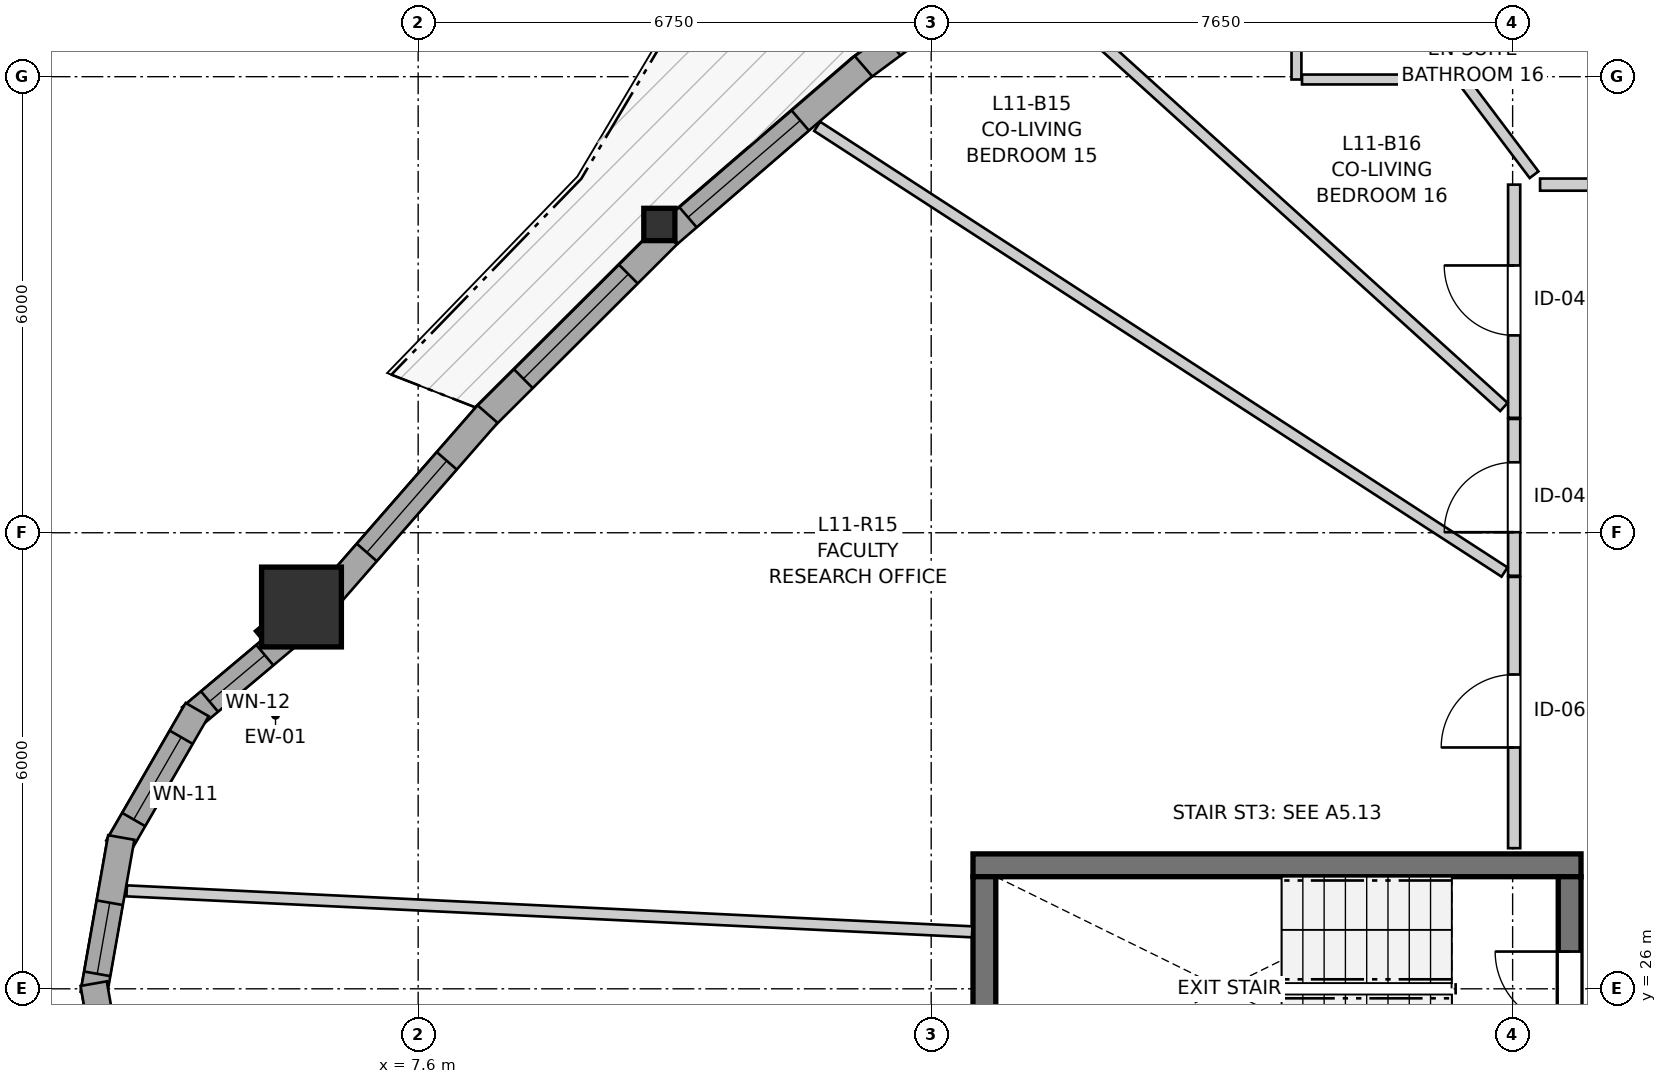
"""IFC4 building model, lengths in metres.
Left out: names, types, materials, properties, quantities, classifications, styles, units other than length and angle.
Written with IfcOpenShell. Run it as: python <this file> out.ifc"""

import sys

from ifc_helpers import new_model, si_unit, direction, frame, frame_2d, origin, origin_2d, place, context, subcontext, project, spatial, rectangle, i_section, extrude, source, transform, mapped, element, fill, save


model = new_model("IFC4")
c1 = context("Model", 3, precision=1e-05, world=origin(), true_north=direction((0.0, 1.0)))
c2 = subcontext(c1, "Body", "Model", "MODEL_VIEW")
j1 = project(units=[si_unit("LENGTHUNIT", "METRE"), si_unit("PLANEANGLEUNIT", "RADIAN")], contexts=[c1])
p1 = place(None, origin())
s1 = spatial("IfcSite", under=j1, at=p1, CompositionType="ELEMENT")
p2 = place(p1, origin())
s2 = spatial("IfcBuilding", under=s1, at=p2, CompositionType="ELEMENT")
p3 = place(p2, frame((0.0, 0.0, 39.8)))
s3 = spatial("IfcBuildingStorey", under=s2, at=p3, CompositionType="ELEMENT", Elevation=39.8)
p4 = place(p3, frame((22.9, 27.625, 0.0), z_axis=(0.0, 0.0, 1.0), x_axis=(-1.0, 0.0, 0.0)))
e1 = element("IfcWall", 1, at=p4, inside=s3, PredefinedType="SHEAR", context=c2, shape_type="SweptSolid", body=[
    extrude(rectangle(XDim=8.0, YDim=0.3, at=frame_2d((4.0, 0.0))), origin(), (0.0, 0.0, 1.0), 2.94),
])
p5 = place(p3, frame((15.05, 27.475, 0.0), z_axis=(0.0, 0.0, 1.0), x_axis=(0.0, -1.0, 0.0)))
e2 = element("IfcWall", 2, at=p5, inside=s3, PredefinedType="SHEAR", context=c2, shape_type="SweptSolid", body=[
    extrude(rectangle(XDim=2.95, YDim=0.3, at=frame_2d((1.475, 0.0))), origin(), (0.0, 0.0, 1.0), 2.94),
])
p6 = place(p3, frame((22.75, 24.525, 0.0), z_axis=(0.0, 0.0, 1.0), x_axis=(0.0, 1.0, 0.0)))
e3 = element("IfcWall", 3, at=p6, inside=s3, PredefinedType="SHEAR", context=c2, shape_type="SweptSolid", body=[
    extrude(rectangle(XDim=2.95, YDim=0.3, at=frame_2d((1.475, 0.0))), origin(), (0.0, 0.0, 1.0), 2.94),
])
p7 = place(p6, frame((0.985, 0.0, 0.0)))
e4 = element("IfcOpeningElement", 4, at=p7, cuts=e3, PredefinedType="OPENING", context=c2, shape_type="SweptSolid", body=[
    extrude(rectangle(XDim=0.98, YDim=2.15, at=frame_2d((0.49, 1.075))), frame((0.0, 0.16, 0.0), z_axis=(0.0, -1.0, 0.0), x_axis=(1.0, 0.0, 0.0)), (0.0, 0.0, 1.0), 0.32),
])
m1 = source(origin(), c2, "Body", "SweptSolid", [
    extrude(rectangle(XDim=1.05, YDim=1.05, at=origin_2d()), origin(), (0.0, 0.0, 1.0), 2.94),
])
p8 = place(p3, frame((6.065, 31.023, 0.0), z_axis=(0.0, 0.0, 1.0), x_axis=(1.0, 0.0, 0.0)))
e5 = element("IfcColumn", 5, at=p8, inside=s3, PredefinedType="COLUMN", context=c2, shape_type="MappedRepresentation", body=[
    mapped(m1, transform((0.0, 0.0, 0.0), x_axis=(1.0, 0.0, 0.0), y_axis=(0.0, 1.0, 0.0), z_axis=(0.0, 0.0, 1.0), scale=1.0)),
])
m2 = source(origin(), c2, "Body", "SweptSolid", [
    extrude(i_section(OverallWidth=0.409, OverallDepth=0.425, WebThickness=0.03, FlangeThickness=0.048, FilletRadius=0.015, at=origin_2d()), origin(), (0.0, 0.0, 1.0), 2.94),
])
p9 = place(p3, frame((10.773, 36.056, 0.0), z_axis=(0.0, 0.0, 1.0), x_axis=(1.0, 0.0, 0.0)))
e6 = element("IfcColumn", 6, at=p9, inside=s3, PredefinedType="PILASTER", context=c2, shape_type="MappedRepresentation", body=[
    mapped(m2, transform((0.0, 0.0, 0.0), x_axis=(1.0, 0.0, 0.0), y_axis=(0.0, 1.0, 0.0), z_axis=(0.0, 0.0, 1.0), scale=1.0)),
])
p10 = place(p3, frame((5.948, 30.696, 0.0), z_axis=(0.0, 0.0, 1.0), x_axis=(-0.766058770736, -0.642770534311, 0.0)))
e7 = element("IfcWall", 7, at=p10, inside=s3, PredefinedType="SOLIDWALL", context=c2, shape_type="SweptSolid", body=[
    extrude(rectangle(XDim=1.752, YDim=0.35, at=frame_2d((0.876, 0.0))), origin(), (0.0, 0.0, 1.0), 2.42),
])
p11 = place(p10, frame((0.476, 0.0, 0.82)))
e8 = element("IfcOpeningElement", 8, at=p11, cuts=e7, PredefinedType="OPENING", context=c2, shape_type="SweptSolid", body=[
    extrude(rectangle(XDim=0.95, YDim=1.35, at=frame_2d((0.475, 0.675))), frame((0.0, 0.185, 0.0), z_axis=(0.0, -1.0, 0.0), x_axis=(1.0, 0.0, 0.0)), (0.0, 0.0, 1.0), 0.37),
])
p12 = place(p3, frame((4.692, 29.674, 0.0), z_axis=(0.0, 0.0, 1.0), x_axis=(-0.49990781971, -0.866078617559, 0.0)))
e9 = element("IfcWall", 9, at=p12, inside=s3, PredefinedType="SOLIDWALL", context=c2, shape_type="SweptSolid", body=[
    extrude(rectangle(XDim=2.09, YDim=0.35, at=frame_2d((1.045, 0.0))), origin(), (0.0, 0.0, 1.0), 2.42),
])
p13 = place(p12, frame((0.42, 0.0, 0.82)))
e10 = element("IfcOpeningElement", 10, at=p13, cuts=e9, PredefinedType="OPENING", context=c2, shape_type="SweptSolid", body=[
    extrude(rectangle(XDim=1.25, YDim=1.35, at=frame_2d((0.625, 0.675))), frame((0.0, 0.185, 0.0), z_axis=(0.0, -1.0, 0.0), x_axis=(1.0, 0.0, 0.0)), (0.0, 0.0, 1.0), 0.37),
])
p14 = place(p3, frame((3.694, 27.991, 0.0), z_axis=(0.0, 0.0, 1.0), x_axis=(-0.173558792186, -0.984823509902, 0.0)))
e11 = element("IfcWall", 11, at=p14, inside=s3, PredefinedType="SOLIDWALL", context=c2, shape_type="SweptSolid", body=[
    extrude(rectangle(XDim=2.09, YDim=0.35, at=frame_2d((1.045, 0.0))), origin(), (0.0, 0.0, 1.0), 2.42),
])
p15 = place(p14, frame((0.871, 0.0, 0.82)))
e12 = element("IfcOpeningElement", 12, at=p15, cuts=e11, PredefinedType="OPENING", context=c2, shape_type="SweptSolid", body=[
    extrude(rectangle(XDim=0.95, YDim=1.35, at=frame_2d((0.475, 0.675))), frame((0.0, 0.185, 0.0), z_axis=(0.0, -1.0, 0.0), x_axis=(1.0, 0.0, 0.0)), (0.0, 0.0, 1.0), 0.37),
])
p16 = place(p3, frame((3.331, 26.068, 0.0), z_axis=(0.0, 0.0, 1.0), x_axis=(0.173558792186, -0.984823509902, 0.0)))
e13 = element("IfcWall", 13, at=p16, inside=s3, PredefinedType="SOLIDWALL", context=c2, shape_type="SweptSolid", body=[
    extrude(rectangle(XDim=2.09, YDim=0.35, at=frame_2d((1.045, 0.0))), origin(), (0.0, 0.0, 1.0), 2.42),
])
p17 = place(p16, frame((0.32, 0.0, 0.82)))
e14 = element("IfcOpeningElement", 14, at=p17, cuts=e13, PredefinedType="OPENING", context=c2, shape_type="SweptSolid", body=[
    extrude(rectangle(XDim=1.45, YDim=1.25, at=frame_2d((0.725, 0.625))), frame((0.0, 0.185, 0.0), z_axis=(0.0, -1.0, 0.0), x_axis=(1.0, 0.0, 0.0)), (0.0, 0.0, 1.0), 0.37),
])
p18 = place(p3, frame((15.846, 39.902, 0.0), z_axis=(0.0, 0.0, 1.0), x_axis=(-0.803789189233, -0.594914228501, 0.0)))
e15 = element("IfcWall", 15, at=p18, inside=s3, PredefinedType="SOLIDWALL", context=c2, shape_type="SweptSolid", body=[
    extrude(rectangle(XDim=3.056, YDim=0.35, at=frame_2d((1.528, 0.0))), origin(), (0.0, 0.0, 1.0), 2.42),
])
p19 = place(p18, frame((1.044, 0.0, 0.82)))
e16 = element("IfcOpeningElement", 16, at=p19, cuts=e15, PredefinedType="OPENING", context=c2, shape_type="SweptSolid", body=[
    extrude(rectangle(XDim=1.45, YDim=1.25, at=frame_2d((0.725, 0.625))), frame((0.0, 0.185, 0.0), z_axis=(0.0, -1.0, 0.0), x_axis=(1.0, 0.0, 0.0)), (0.0, 0.0, 1.0), 0.37),
])
p20 = place(p3, frame((13.458, 38.139, 0.0), z_axis=(0.0, 0.0, 1.0), x_axis=(-0.757450680395, -0.652892385289, 0.0)))
e17 = element("IfcWall", 17, at=p20, inside=s3, PredefinedType="SOLIDWALL", context=c2, shape_type="SweptSolid", body=[
    extrude(rectangle(XDim=3.374, YDim=0.35, at=frame_2d((1.687, 0.0))), origin(), (0.0, 0.0, 1.0), 2.42),
])
p21 = place(p20, frame((1.097, 0.0, 0.82)))
e18 = element("IfcOpeningElement", 18, at=p21, cuts=e17, PredefinedType="OPENING", context=c2, shape_type="SweptSolid", body=[
    extrude(rectangle(XDim=1.95, YDim=1.4, at=frame_2d((0.975, 0.7))), frame((0.0, 0.185, 0.0), z_axis=(0.0, -1.0, 0.0), x_axis=(1.0, 0.0, 0.0)), (0.0, 0.0, 1.0), 0.37),
])
p22 = place(p3, frame((10.883, 35.918, 0.0), z_axis=(0.0, 0.0, 1.0), x_axis=(-0.708386995502, -0.70582424484, 0.0)))
e19 = element("IfcWall", 19, at=p22, inside=s3, PredefinedType="SOLIDWALL", context=c2, shape_type="SweptSolid", body=[
    extrude(rectangle(XDim=3.429, YDim=0.35, at=frame_2d((1.715, 0.0))), origin(), (0.0, 0.0, 1.0), 2.42),
])
p23 = place(p22, frame((0.73, 0.0, 0.82)))
e20 = element("IfcOpeningElement", 20, at=p23, cuts=e19, PredefinedType="OPENING", context=c2, shape_type="SweptSolid", body=[
    extrude(rectangle(XDim=1.95, YDim=1.4, at=frame_2d((0.975, 0.7))), frame((0.0, 0.185, 0.0), z_axis=(0.0, -1.0, 0.0), x_axis=(1.0, 0.0, 0.0)), (0.0, 0.0, 1.0), 0.37),
])
p24 = place(p3, frame((8.513, 33.561, 0.0), z_axis=(0.0, 0.0, 1.0), x_axis=(-0.657640586907, -0.753331838205, 0.0)))
e21 = element("IfcWall", 21, at=p24, inside=s3, PredefinedType="SOLIDWALL", context=c2, shape_type="SweptSolid", body=[
    extrude(rectangle(XDim=3.222, YDim=0.35, at=frame_2d((1.611, 0.0))), origin(), (0.0, 0.0, 1.0), 2.42),
])
p25 = place(p24, frame((0.816, 0.0, 0.82)))
e22 = element("IfcOpeningElement", 22, at=p25, cuts=e21, PredefinedType="OPENING", context=c2, shape_type="SweptSolid", body=[
    extrude(rectangle(XDim=1.6, YDim=1.35, at=frame_2d((0.8, 0.675))), frame((0.0, 0.185, 0.0), z_axis=(0.0, -1.0, 0.0), x_axis=(1.0, 0.0, 0.0)), (0.0, 0.0, 1.0), 0.37),
])
p26 = place(p3, frame((22.02, 27.85, 0.0), z_axis=(0.0, 0.0, 1.0), x_axis=(0.0, 1.0, 0.0)))
e23 = element("IfcWall", 23, at=p26, inside=s3, PredefinedType="PARTITIONING", context=c2, shape_type="SweptSolid", body=[
    extrude(rectangle(XDim=3.569, YDim=0.16, at=frame_2d((1.784, 0.0))), origin(), (0.0, 0.0, 1.0), 2.94),
])
p27 = place(p26, frame((1.325, 0.0, 0.0)))
e24 = element("IfcOpeningElement", 24, at=p27, cuts=e23, PredefinedType="OPENING", context=c2, shape_type="SweptSolid", body=[
    extrude(rectangle(XDim=0.96, YDim=2.1, at=frame_2d((0.48, 1.05))), frame((0.0, 0.09, 0.0), z_axis=(0.0, -1.0, 0.0), x_axis=(1.0, 0.0, 0.0)), (0.0, 0.0, 1.0), 0.18),
])
p28 = place(p3, frame((22.361, 36.58, 0.0), z_axis=(0.0, 0.0, 1.0), x_axis=(1.0, 0.0, 0.0)))
e25 = element("IfcWall", 25, at=p28, inside=s3, PredefinedType="PARTITIONING", context=c2, shape_type="SweptSolid", body=[
    extrude(rectangle(XDim=3.498, YDim=0.16, at=frame_2d((1.749, 0.0))), origin(), (0.0, 0.0, 1.0), 2.548),
])
p29 = place(p28, frame((1.291, 0.0, 0.0)))
e26 = element("IfcOpeningElement", 26, at=p29, cuts=e25, PredefinedType="OPENING", context=c2, shape_type="SweptSolid", body=[
    extrude(rectangle(XDim=0.92, YDim=2.1, at=frame_2d((0.46, 1.05))), frame((0.0, 0.09, 0.0), z_axis=(0.0, -1.0, 0.0), x_axis=(1.0, 0.0, 0.0)), (0.0, 0.0, 1.0), 0.18),
])
p30 = place(p3, frame((22.02, 33.512, 0.0), z_axis=(0.0, 0.0, 1.0), x_axis=(0.0, 1.0, 0.0)))
e27 = element("IfcWall", 27, at=p30, inside=s3, PredefinedType="PARTITIONING", context=c2, shape_type="SweptSolid", body=[
    extrude(rectangle(XDim=3.068, YDim=0.16, at=frame_2d((1.534, 0.0))), origin(), (0.0, 0.0, 1.0), 2.94),
])
p31 = place(p30, frame((1.084, 0.0, 0.0)))
e28 = element("IfcOpeningElement", 28, at=p31, cuts=e27, PredefinedType="OPENING", context=c2, shape_type="SweptSolid", body=[
    extrude(rectangle(XDim=0.92, YDim=2.1, at=frame_2d((0.46, 1.05))), frame((0.0, 0.09, 0.0), z_axis=(0.0, -1.0, 0.0), x_axis=(1.0, 0.0, 0.0)), (0.0, 0.0, 1.0), 0.18),
])
p32 = place(p3, frame((22.02, 31.434, 0.0), z_axis=(0.0, 0.0, 1.0), x_axis=(0.0, 1.0, 0.0)))
e29 = element("IfcWall", 29, at=p32, inside=s3, PredefinedType="PARTITIONING", context=c2, shape_type="SweptSolid", body=[
    extrude(rectangle(XDim=2.063, YDim=0.16, at=frame_2d((1.031, 0.0))), origin(), (0.0, 0.0, 1.0), 2.94),
])
p33 = place(p32, frame((0.573, 0.0, 0.0)))
e30 = element("IfcOpeningElement", 30, at=p33, cuts=e29, PredefinedType="OPENING", context=c2, shape_type="SweptSolid", body=[
    extrude(rectangle(XDim=0.92, YDim=2.1, at=frame_2d((0.46, 1.05))), frame((0.0, 0.09, 0.0), z_axis=(0.0, -1.0, 0.0), x_axis=(1.0, 0.0, 0.0)), (0.0, 0.0, 1.0), 0.18),
])
p34 = place(p3, frame((19.156, 39.863, 0.0), z_axis=(0.0, 0.0, 1.0), x_axis=(0.0, -1.0, 0.0)))
e31 = element("IfcWall", 31, at=p34, inside=s3, PredefinedType="PARTITIONING", context=c2, shape_type="SweptSolid", body=[
    extrude(rectangle(XDim=1.9, YDim=0.13, at=frame_2d((0.95, 0.0))), origin(), (0.0, 0.0, 1.0), 2.94),
])
p35 = place(p34, frame((0.51, 0.0, 0.0)))
e32 = element("IfcOpeningElement", 32, at=p35, cuts=e31, PredefinedType="OPENING", context=c2, shape_type="SweptSolid", body=[
    extrude(rectangle(XDim=0.88, YDim=2.05, at=frame_2d((0.44, 1.025))), frame((0.0, 0.075, 0.0), z_axis=(0.0, -1.0, 0.0), x_axis=(1.0, 0.0, 0.0)), (0.0, 0.0, 1.0), 0.15),
])
p36 = place(p3, frame((3.765, 27.289, 0.0), z_axis=(0.0, 0.0, 1.0), x_axis=(0.998826748689, -0.048426502082, 0.0)))
e33 = element("IfcWall", 33, at=p36, inside=s3, PredefinedType="PARTITIONING", context=c2, shape_type="SweptSolid", body=[
    extrude(rectangle(XDim=11.137, YDim=0.145, at=frame_2d((5.568, 0.0))), origin(), (0.0, 0.0, 1.0), 2.94),
])
p37 = place(p3, frame((12.85, 37.347, 0.0), z_axis=(0.0, 0.0, 1.0), x_axis=(0.839070272759, -0.544023048567, 0.0)))
e34 = element("IfcWall", 34, at=p37, inside=s3, PredefinedType="PARTITIONING", context=c2, shape_type="SweptSolid", body=[
    extrude(rectangle(XDim=10.779, YDim=0.145, at=frame_2d((5.389, 0.0))), origin(), (0.0, 0.0, 1.0), 2.94),
])
p38 = place(p3, frame((15.516, 39.413, 0.0), z_axis=(0.0, 0.0, 1.0), x_axis=(0.741796419009, -0.670625135784, 0.0)))
e35 = element("IfcWall", 35, at=p38, inside=s3, PredefinedType="PARTITIONING", context=c2, shape_type="SweptSolid", body=[
    extrude(rectangle(XDim=8.586, YDim=0.145, at=frame_2d((4.293, 0.0))), origin(), (0.0, 0.0, 1.0), 2.94),
])
p39 = place(p3, frame((20.941, 38.49, 0.0), z_axis=(0.0, 0.0, 1.0), x_axis=(0.601733790382, -0.798696716853, 0.0)))
e36 = element("IfcWall", 36, at=p39, inside=s3, PredefinedType="PARTITIONING", context=c2, shape_type="SweptSolid", body=[
    extrude(rectangle(XDim=2.229, YDim=0.145, at=frame_2d((1.114, 0.0))), origin(), (0.0, 0.0, 1.0), 2.94),
])
p40 = place(p3, frame((19.229, 37.963, 0.0), z_axis=(0.0, 0.0, 1.0), x_axis=(1.0, 0.0, 0.0)))
e37 = element("IfcWall", 37, at=p40, inside=s3, PredefinedType="PARTITIONING", context=c2, shape_type="SweptSolid", body=[
    extrude(rectangle(XDim=1.727, YDim=0.13, at=frame_2d((0.864, 0.0))), origin(), (0.0, 0.0, 1.0), 2.508),
])
p41 = place(p3, frame((20.956, 37.963, 0.0), z_axis=(0.0, 0.0, 1.0), x_axis=(0.0, 1.0, 0.0)))
e38 = element("IfcWall", 38, at=p41, inside=s3, PredefinedType="PARTITIONING", context=c2, shape_type="SweptSolid", body=[
    extrude(rectangle(XDim=0.417, YDim=0.13, at=frame_2d((0.208, 0.0))), origin(), (0.0, 0.0, 1.0), 2.94),
])
m3 = source(origin(), c2, "Body", "SweptSolid", [
    extrude(rectangle(XDim=0.95, YDim=1.35, at=frame_2d((0.475, 0.675))), frame((0.0, 0.03, 0.0), z_axis=(0.0, -1.0, 0.0), x_axis=(1.0, 0.0, 0.0)), (0.0, 0.0, 1.0), 0.06),
])
p42 = place(p11, origin())
e39 = element("IfcWindow", 39, at=p42, inside=s3, PartitioningType="SINGLE_PANEL", PredefinedType="WINDOW", context=c2, shape_type="MappedRepresentation", body=[
    mapped(m3, transform((0.0, 0.0, 0.0), x_axis=(1.0, 0.0, 0.0), y_axis=(0.0, 1.0, 0.0), z_axis=(0.0, 0.0, 1.0), scale=1.0)),
])
fill(e8, e39)
m4 = source(origin(), c2, "Body", "SweptSolid", [
    extrude(rectangle(XDim=1.25, YDim=1.35, at=frame_2d((0.625, 0.675))), frame((0.0, 0.03, 0.0), z_axis=(0.0, -1.0, 0.0), x_axis=(1.0, 0.0, 0.0)), (0.0, 0.0, 1.0), 0.06),
])
p43 = place(p13, origin())
e40 = element("IfcWindow", 40, at=p43, inside=s3, PartitioningType="SINGLE_PANEL", PredefinedType="WINDOW", context=c2, shape_type="MappedRepresentation", body=[
    mapped(m4, transform((0.0, 0.0, 0.0), x_axis=(1.0, 0.0, 0.0), y_axis=(0.0, 1.0, 0.0), z_axis=(0.0, 0.0, 1.0), scale=1.0)),
])
fill(e10, e40)
p44 = place(p15, origin())
e41 = element("IfcWindow", 41, at=p44, inside=s3, PartitioningType="SINGLE_PANEL", PredefinedType="WINDOW", context=c2, shape_type="MappedRepresentation", body=[
    mapped(m3, transform((0.0, 0.0, 0.0), x_axis=(1.0, 0.0, 0.0), y_axis=(0.0, 1.0, 0.0), z_axis=(0.0, 0.0, 1.0), scale=1.0)),
])
fill(e12, e41)
m5 = source(origin(), c2, "Body", "SweptSolid", [
    extrude(rectangle(XDim=1.95, YDim=1.4, at=frame_2d((0.975, 0.7))), frame((0.0, 0.03, 0.0), z_axis=(0.0, -1.0, 0.0), x_axis=(1.0, 0.0, 0.0)), (0.0, 0.0, 1.0), 0.06),
])
p45 = place(p21, origin())
e42 = element("IfcWindow", 42, at=p45, inside=s3, PartitioningType="SINGLE_PANEL", PredefinedType="WINDOW", context=c2, shape_type="MappedRepresentation", body=[
    mapped(m5, transform((0.0, 0.0, 0.0), x_axis=(1.0, 0.0, 0.0), y_axis=(0.0, 1.0, 0.0), z_axis=(0.0, 0.0, 1.0), scale=1.0)),
])
fill(e18, e42)
p46 = place(p23, origin())
e43 = element("IfcWindow", 43, at=p46, inside=s3, PartitioningType="SINGLE_PANEL", PredefinedType="WINDOW", context=c2, shape_type="MappedRepresentation", body=[
    mapped(m5, transform((0.0, 0.0, 0.0), x_axis=(1.0, 0.0, 0.0), y_axis=(0.0, 1.0, 0.0), z_axis=(0.0, 0.0, 1.0), scale=1.0)),
])
fill(e20, e43)
m6 = source(origin(), c2, "Body", "SweptSolid", [
    extrude(rectangle(XDim=1.6, YDim=1.35, at=frame_2d((0.8, 0.675))), frame((0.0, 0.03, 0.0), z_axis=(0.0, -1.0, 0.0), x_axis=(1.0, 0.0, 0.0)), (0.0, 0.0, 1.0), 0.06),
])
p47 = place(p25, origin())
e44 = element("IfcWindow", 44, at=p47, inside=s3, PartitioningType="SINGLE_PANEL", PredefinedType="WINDOW", context=c2, shape_type="MappedRepresentation", body=[
    mapped(m6, transform((0.0, 0.0, 0.0), x_axis=(1.0, 0.0, 0.0), y_axis=(0.0, 1.0, 0.0), z_axis=(0.0, 0.0, 1.0), scale=1.0)),
])
fill(e22, e44)
m7 = source(origin(), c2, "Body", "SweptSolid", [
    extrude(rectangle(XDim=0.98, YDim=2.15, at=frame_2d((0.49, 1.075))), frame((0.0, 0.025, 0.0), z_axis=(0.0, -1.0, 0.0), x_axis=(1.0, 0.0, 0.0)), (0.0, 0.0, 1.0), 0.05),
])
p48 = place(p7, origin())
e45 = element("IfcDoor", 45, at=p48, inside=s3, OperationType="SINGLE_SWING_RIGHT", PredefinedType="DOOR", context=c2, shape_type="MappedRepresentation", body=[
    mapped(m7, transform((0.0, 0.0, 0.0), x_axis=(1.0, 0.0, 0.0), y_axis=(0.0, 1.0, 0.0), z_axis=(0.0, 0.0, 1.0), scale=1.0)),
])
fill(e4, e45)
m8 = source(origin(), c2, "Body", "SweptSolid", [
    extrude(rectangle(XDim=0.96, YDim=2.1, at=frame_2d((0.48, 1.05))), frame((0.0, 0.025, 0.0), z_axis=(0.0, -1.0, 0.0), x_axis=(1.0, 0.0, 0.0)), (0.0, 0.0, 1.0), 0.05),
])
p49 = place(p27, origin())
e46 = element("IfcDoor", 46, at=p49, inside=s3, OperationType="SINGLE_SWING_LEFT", PredefinedType="DOOR", context=c2, shape_type="MappedRepresentation", body=[
    mapped(m8, transform((0.0, 0.0, 0.0), x_axis=(1.0, 0.0, 0.0), y_axis=(0.0, 1.0, 0.0), z_axis=(0.0, 0.0, 1.0), scale=1.0)),
])
fill(e24, e46)
m9 = source(origin(), c2, "Body", "SweptSolid", [
    extrude(rectangle(XDim=0.92, YDim=2.1, at=frame_2d((0.46, 1.05))), frame((0.0, 0.025, 0.0), z_axis=(0.0, -1.0, 0.0), x_axis=(1.0, 0.0, 0.0)), (0.0, 0.0, 1.0), 0.05),
])
p50 = place(p31, origin())
e47 = element("IfcDoor", 47, at=p50, inside=s3, OperationType="SINGLE_SWING_RIGHT", PredefinedType="DOOR", context=c2, shape_type="MappedRepresentation", body=[
    mapped(m9, transform((0.0, 0.0, 0.0), x_axis=(1.0, 0.0, 0.0), y_axis=(0.0, 1.0, 0.0), z_axis=(0.0, 0.0, 1.0), scale=1.0)),
])
fill(e28, e47)
p51 = place(p33, origin())
e48 = element("IfcDoor", 48, at=p51, inside=s3, OperationType="SINGLE_SWING_LEFT", PredefinedType="DOOR", context=c2, shape_type="MappedRepresentation", body=[
    mapped(m9, transform((0.0, 0.0, 0.0), x_axis=(1.0, 0.0, 0.0), y_axis=(0.0, 1.0, 0.0), z_axis=(0.0, 0.0, 1.0), scale=1.0)),
])
fill(e30, e48)
save(model, sys.argv[1])
